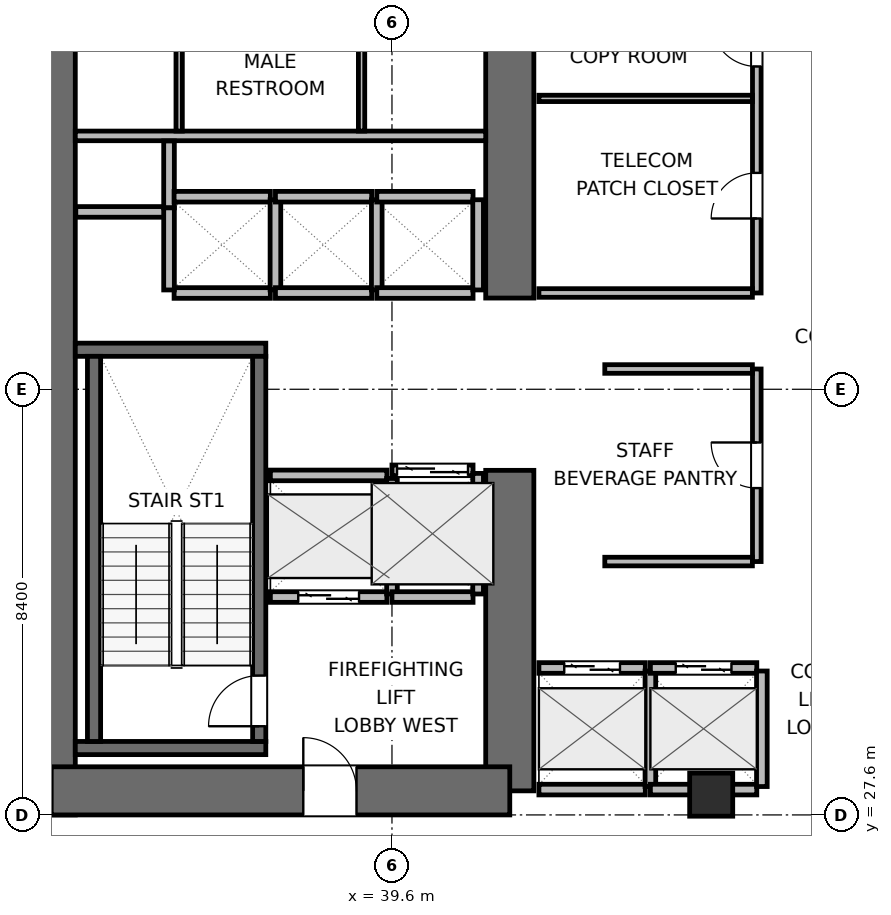
"""IFC4 building model, lengths in metres.
Left out: names, types, materials, properties, quantities, classifications, styles, units other than length and angle.
Written with IfcOpenShell. Run it as: python <this file> out.ifc"""

import sys

from ifc_helpers import new_model, si_unit, direction, frame, frame_2d, origin, origin_2d, place, context, subcontext, project, spatial, rectangle, extrude, element, fill, save


model = new_model("IFC4")
c1 = context("Model", 3, precision=1e-05, world=origin(), true_north=direction((0.0, 1.0)))
c2 = subcontext(c1, "Body", "Model", "MODEL_VIEW")
j1 = project(units=[si_unit("LENGTHUNIT", "METRE"), si_unit("PLANEANGLEUNIT", "RADIAN")], contexts=[c1])
p1 = place(None, origin())
s1 = spatial("IfcSite", under=j1, at=p1, CompositionType="ELEMENT")
p2 = place(p1, origin())
s2 = spatial("IfcBuilding", under=s1, at=p2, CompositionType="ELEMENT")
p3 = place(p2, frame((0.0, 0.0, 29.4)))
s3 = spatial("IfcBuildingStorey", under=s2, at=p3, CompositionType="ELEMENT", Elevation=29.4)
p4 = place(p3, frame((32.875, 27.6, 0.0), z_axis=(0.0, 0.0, 1.0), x_axis=(0.0, 1.0, 0.0)))
e1 = element("IfcWall", 1, at=p4, inside=s3, PredefinedType="SHEAR", context=c2, shape_type="SweptSolid", body=[
    extrude(rectangle(XDim=16.8, YDim=0.95, at=frame_2d((8.4, 0.0))), origin(), (0.0, 0.0, 1.0), 3.9),
])
p5 = place(p3, frame((41.925, 28.075, 0.0), z_axis=(0.0, 0.0, 1.0), x_axis=(0.0, 1.0, 0.0)))
e2 = element("IfcWall", 2, at=p5, inside=s3, PredefinedType="SHEAR", context=c2, shape_type="SweptSolid", body=[
    extrude(rectangle(XDim=6.325, YDim=0.95, at=frame_2d((3.163, 0.0))), origin(), (0.0, 0.0, 1.0), 3.9),
])
p6 = place(p3, frame((41.925, 37.8, 0.0), z_axis=(0.0, 0.0, 1.0), x_axis=(0.0, 1.0, 0.0)))
e3 = element("IfcWall", 3, at=p6, inside=s3, PredefinedType="SHEAR", context=c2, shape_type="SweptSolid", body=[
    extrude(rectangle(XDim=6.125, YDim=0.95, at=frame_2d((3.062, 0.0))), origin(), (0.0, 0.0, 1.0), 3.9),
])
p7 = place(p3, frame((32.875, 28.075, 0.0), z_axis=(0.0, 0.0, 1.0), x_axis=(1.0, 0.0, 0.0)))
e4 = element("IfcWall", 4, at=p7, inside=s3, PredefinedType="SHEAR", context=c2, shape_type="SweptSolid", body=[
    extrude(rectangle(XDim=9.05, YDim=0.95, at=frame_2d((4.525, 0.0))), origin(), (0.0, 0.0, 1.0), 3.9),
])
p8 = place(p7, frame((4.975, 0.0, 0.0)))
e5 = element("IfcOpeningElement", 5, at=p8, cuts=e4, PredefinedType="OPENING", context=c2, shape_type="SweptSolid", body=[
    extrude(rectangle(XDim=1.05, YDim=2.04, at=frame_2d((0.525, 1.02))), frame((0.0, 0.485, 0.0), z_axis=(0.0, -1.0, 0.0), x_axis=(1.0, 0.0, 0.0)), (0.0, 0.0, 1.0), 0.97),
])
for number, where, z_axis, x_axis in (
    (6, (33.35, 28.92, 0.0), (0.0, 0.0, 1.0), (1.0, 0.0, 0.0)),
    (7, (33.35, 36.78, 0.0), (0.0, 0.0, 1.0), (1.0, 0.0, 0.0)),
):
    element("IfcWall", number, at=place(p3, frame(where, z_axis=z_axis, x_axis=x_axis)), inside=s3, PredefinedType="SHEAR", context=c2, shape_type="SweptSolid", body=[
        extrude(rectangle(XDim=3.76, YDim=0.26, at=frame_2d((1.88, 0.0))), origin(), (0.0, 0.0, 1.0), 3.9),
    ])
p9 = place(p3, frame((33.72, 29.05, 0.0), z_axis=(0.0, 0.0, 1.0), x_axis=(0.0, 1.0, 0.0)))
e8 = element("IfcWall", 8, at=p9, inside=s3, PredefinedType="SHEAR", context=c2, shape_type="SweptSolid", body=[
    extrude(rectangle(XDim=7.6, YDim=0.26, at=frame_2d((3.8, 0.0))), origin(), (0.0, 0.0, 1.0), 3.9),
])
p10 = place(p3, frame((36.98, 29.05, 0.0), z_axis=(0.0, 0.0, 1.0), x_axis=(0.0, 1.0, 0.0)))
e9 = element("IfcWall", 9, at=p10, inside=s3, PredefinedType="SHEAR", context=c2, shape_type="SweptSolid", body=[
    extrude(rectangle(XDim=7.6, YDim=0.26, at=frame_2d((3.8, 0.0))), origin(), (0.0, 0.0, 1.0), 3.9),
])
p11 = place(p10, frame((0.3, 0.0, 0.0)))
e10 = element("IfcOpeningElement", 10, at=p11, cuts=e9, PredefinedType="OPENING", context=c2, shape_type="SweptSolid", body=[
    extrude(rectangle(XDim=1.0, YDim=2.04, at=frame_2d((0.5, 1.02))), frame((0.0, 0.14, 0.0), z_axis=(0.0, -1.0, 0.0), x_axis=(1.0, 0.0, 0.0)), (0.0, 0.0, 1.0), 0.28),
])
p12 = place(p3, frame((45.9, 28.0, 0.0), z_axis=(0.0, 0.0, 1.0), x_axis=(1.0, 0.0, 0.0)))
e11 = element("IfcColumn", 11, at=p12, inside=s3, PredefinedType="COLUMN", context=c2, shape_type="SweptSolid", body=[
    extrude(rectangle(XDim=0.85, YDim=0.85, at=origin_2d()), origin(), (0.0, 0.0, 1.0), 3.9),
])
p13 = place(p3, frame((33.35, 41.0, 0.0), z_axis=(0.0, 0.0, 1.0), x_axis=(1.0, 0.0, 0.0)))
e12 = element("IfcWall", 12, at=p13, inside=s3, PredefinedType="PLUMBINGWALL", context=c2, shape_type="SweptSolid", body=[
    extrude(rectangle(XDim=8.1, YDim=0.19, at=frame_2d((4.05, 0.0))), origin(), (0.0, 0.0, 1.0), 3.64),
])
for number, where, z_axis, x_axis in (
    (13, (35.4, 41.095, 0.0), (0.0, 0.0, 1.0), (0.0, 1.0, 0.0)),
    (14, (39.0, 41.095, 0.0), (0.0, 0.0, 1.0), (0.0, 1.0, 0.0)),
):
    element("IfcWall", number, at=place(p3, frame(where, z_axis=z_axis, x_axis=x_axis)), inside=s3, PredefinedType="PARTITIONING", context=c2, shape_type="SweptSolid", body=[
        extrude(rectangle(XDim=2.355, YDim=0.125, at=frame_2d((1.177, 0.0))), origin(), (0.0, 0.0, 1.0), 3.64),
    ])
p14 = place(p3, frame((33.36, 39.5, 0.0), z_axis=(0.0, 0.0, 1.0), x_axis=(1.0, 0.0, 0.0)))
e15 = element("IfcWall", 15, at=p14, inside=s3, PredefinedType="PARTITIONING", context=c2, shape_type="SweptSolid", body=[
    extrude(rectangle(XDim=1.86, YDim=0.21, at=frame_2d((0.93, 0.0))), origin(), (0.0, 0.0, 1.0), 3.64),
])
p15 = place(p3, frame((35.2, 39.58, 0.0), z_axis=(0.0, 0.0, 1.0), x_axis=(0.0, 1.0, 0.0)))
e16 = element("IfcWall", 16, at=p15, inside=s3, PredefinedType="PARTITIONING", context=c2, shape_type="SweptSolid", body=[
    extrude(rectangle(XDim=1.32, YDim=0.21, at=frame_2d((0.66, 0.0))), origin(), (0.0, 0.0, 1.0), 3.64),
])
p16 = place(p3, frame((37.2, 31.9, 0.0), z_axis=(0.0, 0.0, 1.0), x_axis=(1.0, 0.0, 0.0)))
e17 = element("IfcWall", 17, at=p16, inside=s3, PredefinedType="PARTITIONING", context=c2, shape_type="SweptSolid", body=[
    extrude(rectangle(XDim=2.3, YDim=0.21, at=frame_2d((1.15, 0.0))), origin(), (0.0, 0.0, 1.0), 3.64),
])
p17 = place(p16, frame((0.55, 0.0, 0.0)))
e18 = element("IfcOpeningElement", 18, at=p17, cuts=e17, PredefinedType="OPENING", context=c2, shape_type="SweptSolid", body=[
    extrude(rectangle(XDim=1.2, YDim=2.04, at=frame_2d((0.6, 1.02))), frame((0.0, 0.115, 0.0), z_axis=(0.0, -1.0, 0.0), x_axis=(1.0, 0.0, 0.0)), (0.0, 0.0, 1.0), 0.23),
])
p18 = place(p3, frame((37.2, 34.3, 0.0), z_axis=(0.0, 0.0, 1.0), x_axis=(1.0, 0.0, 0.0)))
e19 = element("IfcWall", 19, at=p18, inside=s3, PredefinedType="PARTITIONING", context=c2, shape_type="SweptSolid", body=[
    extrude(rectangle(XDim=2.3, YDim=0.21, at=frame_2d((1.15, 0.0))), origin(), (0.0, 0.0, 1.0), 3.64),
])
p19 = place(p3, frame((39.6, 31.96, 0.0), z_axis=(0.0, 0.0, 1.0), x_axis=(0.0, 1.0, 0.0)))
e20 = element("IfcWall", 20, at=p19, inside=s3, PredefinedType="PARTITIONING", context=c2, shape_type="SweptSolid", body=[
    extrude(rectangle(XDim=2.28, YDim=0.21, at=frame_2d((1.14, 0.0))), origin(), (0.0, 0.0, 1.0), 3.64),
])
p20 = place(p3, frame((39.6, 34.4, 0.0), z_axis=(0.0, 0.0, 1.0), x_axis=(1.0, 0.0, 0.0)))
e21 = element("IfcWall", 21, at=p20, inside=s3, PredefinedType="PARTITIONING", context=c2, shape_type="SweptSolid", body=[
    extrude(rectangle(XDim=1.6, YDim=0.21, at=frame_2d((0.8, 0.0))), origin(), (0.0, 0.0, 1.0), 3.64),
])
p21 = place(p20, frame((0.1, 0.0, 0.0)))
e22 = element("IfcOpeningElement", 22, at=p21, cuts=e21, PredefinedType="OPENING", context=c2, shape_type="SweptSolid", body=[
    extrude(rectangle(XDim=1.4, YDim=2.06, at=frame_2d((0.7, 1.03))), frame((0.0, 0.115, 0.0), z_axis=(0.0, -1.0, 0.0), x_axis=(1.0, 0.0, 0.0)), (0.0, 0.0, 1.0), 0.23),
])
p22 = place(p3, frame((39.6, 31.9, 0.0), z_axis=(0.0, 0.0, 1.0), x_axis=(1.0, 0.0, 0.0)))
e23 = element("IfcWall", 23, at=p22, inside=s3, PredefinedType="PARTITIONING", context=c2, shape_type="SweptSolid", body=[
    extrude(rectangle(XDim=1.6, YDim=0.21, at=frame_2d((0.8, 0.0))), origin(), (0.0, 0.0, 1.0), 3.64),
])
p23 = place(p3, frame((41.3, 31.96, 0.0), z_axis=(0.0, 0.0, 1.0), x_axis=(0.0, 1.0, 0.0)))
e24 = element("IfcWall", 24, at=p23, inside=s3, PredefinedType="PARTITIONING", context=c2, shape_type="SweptSolid", body=[
    extrude(rectangle(XDim=2.38, YDim=0.21, at=frame_2d((1.19, 0.0))), origin(), (0.0, 0.0, 1.0), 3.64),
])
p24 = place(p3, frame((42.5, 30.5, 0.0), z_axis=(0.0, 0.0, 1.0), x_axis=(1.0, 0.0, 0.0)))
e25 = element("IfcWall", 25, at=p24, inside=s3, PredefinedType="PARTITIONING", context=c2, shape_type="SweptSolid", body=[
    extrude(rectangle(XDim=2.1, YDim=0.21, at=frame_2d((1.05, 0.0))), origin(), (0.0, 0.0, 1.0), 3.64),
])
p25 = place(p24, frame((0.5, 0.0, 0.0)))
e26 = element("IfcOpeningElement", 26, at=p25, cuts=e25, PredefinedType="OPENING", context=c2, shape_type="SweptSolid", body=[
    extrude(rectangle(XDim=1.1, YDim=2.04, at=frame_2d((0.55, 1.02))), frame((0.0, 0.115, 0.0), z_axis=(0.0, -1.0, 0.0), x_axis=(1.0, 0.0, 0.0)), (0.0, 0.0, 1.0), 0.23),
])
p26 = place(p3, frame((42.5, 28.1, 0.0), z_axis=(0.0, 0.0, 1.0), x_axis=(1.0, 0.0, 0.0)))
e27 = element("IfcWall", 27, at=p26, inside=s3, PredefinedType="PARTITIONING", context=c2, shape_type="SweptSolid", body=[
    extrude(rectangle(XDim=2.1, YDim=0.21, at=frame_2d((1.05, 0.0))), origin(), (0.0, 0.0, 1.0), 2.525),
])
p27 = place(p3, frame((44.7, 28.16, 0.0), z_axis=(0.0, 0.0, 1.0), x_axis=(0.0, 1.0, 0.0)))
e28 = element("IfcWall", 28, at=p27, inside=s3, PredefinedType="PARTITIONING", context=c2, shape_type="SweptSolid", body=[
    extrude(rectangle(XDim=2.28, YDim=0.21, at=frame_2d((1.14, 0.0))), origin(), (0.0, 0.0, 1.0), 3.64),
])
p28 = place(p3, frame((44.7, 30.5, 0.0), z_axis=(0.0, 0.0, 1.0), x_axis=(1.0, 0.0, 0.0)))
e29 = element("IfcWall", 29, at=p28, inside=s3, PredefinedType="PARTITIONING", context=c2, shape_type="SweptSolid", body=[
    extrude(rectangle(XDim=2.1, YDim=0.21, at=frame_2d((1.05, 0.0))), origin(), (0.0, 0.0, 1.0), 3.64),
])
p29 = place(p28, frame((0.5, 0.0, 0.0)))
e30 = element("IfcOpeningElement", 30, at=p29, cuts=e29, PredefinedType="OPENING", context=c2, shape_type="SweptSolid", body=[
    extrude(rectangle(XDim=1.1, YDim=2.04, at=frame_2d((0.55, 1.02))), frame((0.0, 0.115, 0.0), z_axis=(0.0, -1.0, 0.0), x_axis=(1.0, 0.0, 0.0)), (0.0, 0.0, 1.0), 0.23),
])
p30 = place(p3, frame((44.7, 28.1, 0.0), z_axis=(0.0, 0.0, 1.0), x_axis=(1.0, 0.0, 0.0)))
e31 = element("IfcWall", 31, at=p30, inside=s3, PredefinedType="PARTITIONING", context=c2, shape_type="SweptSolid", body=[
    extrude(rectangle(XDim=2.1, YDim=0.21, at=frame_2d((1.05, 0.0))), origin(), (0.0, 0.0, 1.0), 2.525),
])
p31 = place(p3, frame((46.9, 28.16, 0.0), z_axis=(0.0, 0.0, 1.0), x_axis=(0.0, 1.0, 0.0)))
e32 = element("IfcWall", 32, at=p31, inside=s3, PredefinedType="PARTITIONING", context=c2, shape_type="SweptSolid", body=[
    extrude(rectangle(XDim=2.28, YDim=0.21, at=frame_2d((1.14, 0.0))), origin(), (0.0, 0.0, 1.0), 3.64),
])
for number, where, z_axis, x_axis in (
    (33, (35.3, 37.9, 0.0), (0.0, 0.0, 1.0), (1.0, 0.0, 0.0)),
    (34, (35.3, 39.8, 0.0), (0.0, 0.0, 1.0), (1.0, 0.0, 0.0)),
):
    element("IfcWall", number, at=place(p3, frame(where, z_axis=z_axis, x_axis=x_axis)), inside=s3, PredefinedType="PARTITIONING", context=c2, shape_type="SweptSolid", body=[
        extrude(rectangle(XDim=1.9, YDim=0.21, at=frame_2d((0.95, 0.0))), origin(), (0.0, 0.0, 1.0), 3.64),
    ])
p32 = place(p3, frame((35.2, 37.96, 0.0), z_axis=(0.0, 0.0, 1.0), x_axis=(0.0, 1.0, 0.0)))
e35 = element("IfcWall", 35, at=p32, inside=s3, PredefinedType="PARTITIONING", context=c2, shape_type="SweptSolid", body=[
    extrude(rectangle(XDim=1.62, YDim=0.21, at=frame_2d((0.81, 0.0))), origin(), (0.0, 0.0, 1.0), 3.64),
])
p33 = place(p3, frame((37.3, 37.96, 0.0), z_axis=(0.0, 0.0, 1.0), x_axis=(0.0, 1.0, 0.0)))
e36 = element("IfcWall", 36, at=p33, inside=s3, PredefinedType="PARTITIONING", context=c2, shape_type="SweptSolid", body=[
    extrude(rectangle(XDim=1.78, YDim=0.21, at=frame_2d((0.89, 0.0))), origin(), (0.0, 0.0, 1.0), 3.64),
])
for number, where, z_axis, x_axis in (
    (37, (37.3, 37.9, 0.0), (0.0, 0.0, 1.0), (1.0, 0.0, 0.0)),
    (38, (37.3, 39.8, 0.0), (0.0, 0.0, 1.0), (1.0, 0.0, 0.0)),
):
    element("IfcWall", number, at=place(p3, frame(where, z_axis=z_axis, x_axis=x_axis)), inside=s3, PredefinedType="PARTITIONING", context=c2, shape_type="SweptSolid", body=[
        extrude(rectangle(XDim=1.9, YDim=0.21, at=frame_2d((0.95, 0.0))), origin(), (0.0, 0.0, 1.0), 3.64),
    ])
p34 = place(p3, frame((39.3, 37.96, 0.0), z_axis=(0.0, 0.0, 1.0), x_axis=(0.0, 1.0, 0.0)))
e39 = element("IfcWall", 39, at=p34, inside=s3, PredefinedType="PARTITIONING", context=c2, shape_type="SweptSolid", body=[
    extrude(rectangle(XDim=1.78, YDim=0.21, at=frame_2d((0.89, 0.0))), origin(), (0.0, 0.0, 1.0), 3.64),
])
for number, where, z_axis, x_axis in (
    (40, (39.3, 37.9, 0.0), (0.0, 0.0, 1.0), (1.0, 0.0, 0.0)),
    (41, (39.3, 39.8, 0.0), (0.0, 0.0, 1.0), (1.0, 0.0, 0.0)),
):
    element("IfcWall", number, at=place(p3, frame(where, z_axis=z_axis, x_axis=x_axis)), inside=s3, PredefinedType="PARTITIONING", context=c2, shape_type="SweptSolid", body=[
        extrude(rectangle(XDim=1.9, YDim=0.21, at=frame_2d((0.95, 0.0))), origin(), (0.0, 0.0, 1.0), 3.64),
    ])
p35 = place(p3, frame((41.3, 37.96, 0.0), z_axis=(0.0, 0.0, 1.0), x_axis=(0.0, 1.0, 0.0)))
e42 = element("IfcWall", 42, at=p35, inside=s3, PredefinedType="PARTITIONING", context=c2, shape_type="SweptSolid", body=[
    extrude(rectangle(XDim=1.78, YDim=0.21, at=frame_2d((0.89, 0.0))), origin(), (0.0, 0.0, 1.0), 3.64),
])
p36 = place(p3, frame((46.8, 32.6, 0.0), z_axis=(0.0, 0.0, 1.0), x_axis=(0.0, 1.0, 0.0)))
e43 = element("IfcWall", 43, at=p36, inside=s3, PredefinedType="PARTITIONING", context=c2, shape_type="SweptSolid", body=[
    extrude(rectangle(XDim=3.8, YDim=0.17, at=frame_2d((1.9, 0.0))), origin(), (0.0, 0.0, 1.0), 3.64),
])
p37 = place(p36, frame((1.45, 0.0, 0.0)))
e44 = element("IfcOpeningElement", 44, at=p37, cuts=e43, PredefinedType="OPENING", context=c2, shape_type="SweptSolid", body=[
    extrude(rectangle(XDim=0.9, YDim=2.02, at=frame_2d((0.45, 1.01))), frame((0.0, 0.095, 0.0), z_axis=(0.0, -1.0, 0.0), x_axis=(1.0, 0.0, 0.0)), (0.0, 0.0, 1.0), 0.19),
])
for number, where, z_axis, x_axis in (
    (45, (43.8, 32.6, 0.0), (0.0, 0.0, 1.0), (1.0, 0.0, 0.0)),
    (46, (43.8, 36.4, 0.0), (0.0, 0.0, 1.0), (1.0, 0.0, 0.0)),
):
    element("IfcWall", number, at=place(p3, frame(where, z_axis=z_axis, x_axis=x_axis)), inside=s3, PredefinedType="PARTITIONING", context=c2, shape_type="SweptSolid", body=[
        extrude(rectangle(XDim=2.913, YDim=0.17, at=frame_2d((1.457, 0.0))), origin(), (0.0, 0.0, 1.0), 3.64),
    ])
p38 = place(p3, frame((46.8, 37.9, 0.0), z_axis=(0.0, 0.0, 1.0), x_axis=(0.0, 1.0, 0.0)))
e47 = element("IfcWall", 47, at=p38, inside=s3, PredefinedType="PARTITIONING", context=c2, shape_type="SweptSolid", body=[
    extrude(rectangle(XDim=6.0, YDim=0.17, at=frame_2d((3.0, 0.0))), origin(), (0.0, 0.0, 1.0), 3.64),
])
p39 = place(p38, frame((1.47, 0.0, 0.0)))
e48 = element("IfcOpeningElement", 48, at=p39, cuts=e47, PredefinedType="OPENING", context=c2, shape_type="SweptSolid", body=[
    extrude(rectangle(XDim=0.9, YDim=2.02, at=frame_2d((0.45, 1.01))), frame((0.0, 0.095, 0.0), z_axis=(0.0, -1.0, 0.0), x_axis=(1.0, 0.0, 0.0)), (0.0, 0.0, 1.0), 0.19),
])
p40 = place(p38, frame((4.47, 0.0, 0.0)))
e49 = element("IfcOpeningElement", 49, at=p40, cuts=e47, PredefinedType="OPENING", context=c2, shape_type="SweptSolid", body=[
    extrude(rectangle(XDim=0.9, YDim=2.02, at=frame_2d((0.45, 1.01))), frame((0.0, 0.095, 0.0), z_axis=(0.0, -1.0, 0.0), x_axis=(1.0, 0.0, 0.0)), (0.0, 0.0, 1.0), 0.19),
])
p41 = place(p3, frame((42.5, 37.9, 0.0), z_axis=(0.0, 0.0, 1.0), x_axis=(1.0, 0.0, 0.0)))
e50 = element("IfcWall", 50, at=p41, inside=s3, PredefinedType="PARTITIONING", context=c2, shape_type="SweptSolid", body=[
    extrude(rectangle(XDim=4.213, YDim=0.17, at=frame_2d((2.106, 0.0))), origin(), (0.0, 0.0, 1.0), 3.64),
])
p42 = place(p3, frame((42.5, 41.74, 0.0), z_axis=(0.0, 0.0, 1.0), x_axis=(1.0, 0.0, 0.0)))
e51 = element("IfcWall", 51, at=p42, inside=s3, PredefinedType="PARTITIONING", context=c2, shape_type="SweptSolid", body=[
    extrude(rectangle(XDim=4.213, YDim=0.125, at=frame_2d((2.106, 0.0))), origin(), (0.0, 0.0, 1.0), 3.64),
])
p43 = place(p11, origin())
e52 = element("IfcDoor", 52, at=p43, inside=s3, OperationType="SINGLE_SWING_LEFT", PredefinedType="DOOR", context=c2, shape_type="SweptSolid", body=[
    extrude(rectangle(XDim=1.0, YDim=2.04, at=frame_2d((0.5, 1.02))), frame((0.0, 0.025, 0.0), z_axis=(0.0, -1.0, 0.0), x_axis=(1.0, 0.0, 0.0)), (0.0, 0.0, 1.0), 0.05),
])
fill(e10, e52)
p44 = place(p17, origin())
e53 = element("IfcDoor", 53, at=p44, inside=s3, OperationType="DOUBLE_DOOR_SLIDING", PredefinedType="DOOR", context=c2, shape_type="SweptSolid", body=[
    extrude(rectangle(XDim=1.2, YDim=2.04, at=frame_2d((0.6, 1.02))), frame((0.0, 0.025, 0.0), z_axis=(0.0, -1.0, 0.0), x_axis=(1.0, 0.0, 0.0)), (0.0, 0.0, 1.0), 0.05),
])
fill(e18, e53)
p45 = place(p21, origin())
e54 = element("IfcDoor", 54, at=p45, inside=s3, OperationType="DOUBLE_DOOR_SLIDING", PredefinedType="DOOR", context=c2, shape_type="SweptSolid", body=[
    extrude(rectangle(XDim=1.4, YDim=2.06, at=frame_2d((0.7, 1.03))), frame((0.0, 0.025, 0.0), z_axis=(0.0, -1.0, 0.0), x_axis=(1.0, 0.0, 0.0)), (0.0, 0.0, 1.0), 0.05),
])
fill(e22, e54)
p46 = place(p25, origin())
e55 = element("IfcDoor", 55, at=p46, inside=s3, OperationType="DOUBLE_DOOR_SLIDING", PredefinedType="DOOR", context=c2, shape_type="SweptSolid", body=[
    extrude(rectangle(XDim=1.1, YDim=2.04, at=frame_2d((0.55, 1.02))), frame((0.0, 0.025, 0.0), z_axis=(0.0, -1.0, 0.0), x_axis=(1.0, 0.0, 0.0)), (0.0, 0.0, 1.0), 0.05),
])
fill(e26, e55)
p47 = place(p29, origin())
e56 = element("IfcDoor", 56, at=p47, inside=s3, OperationType="DOUBLE_DOOR_SLIDING", PredefinedType="DOOR", context=c2, shape_type="SweptSolid", body=[
    extrude(rectangle(XDim=1.1, YDim=2.04, at=frame_2d((0.55, 1.02))), frame((0.0, 0.025, 0.0), z_axis=(0.0, -1.0, 0.0), x_axis=(1.0, 0.0, 0.0)), (0.0, 0.0, 1.0), 0.05),
])
fill(e30, e56)
p48 = place(p8, origin())
e57 = element("IfcDoor", 57, at=p48, inside=s3, OperationType="SINGLE_SWING_LEFT", PredefinedType="DOOR", context=c2, shape_type="SweptSolid", body=[
    extrude(rectangle(XDim=1.05, YDim=2.04, at=frame_2d((0.525, 1.02))), frame((0.0, 0.025, 0.0), z_axis=(0.0, -1.0, 0.0), x_axis=(1.0, 0.0, 0.0)), (0.0, 0.0, 1.0), 0.05),
])
fill(e5, e57)
p49 = place(p37, origin())
e58 = element("IfcDoor", 58, at=p49, inside=s3, OperationType="SINGLE_SWING_RIGHT", PredefinedType="DOOR", context=c2, shape_type="SweptSolid", body=[
    extrude(rectangle(XDim=0.9, YDim=2.02, at=frame_2d((0.45, 1.01))), frame((0.0, 0.025, 0.0), z_axis=(0.0, -1.0, 0.0), x_axis=(1.0, 0.0, 0.0)), (0.0, 0.0, 1.0), 0.05),
])
fill(e44, e58)
p50 = place(p39, origin())
e59 = element("IfcDoor", 59, at=p50, inside=s3, OperationType="SINGLE_SWING_LEFT", PredefinedType="DOOR", context=c2, shape_type="SweptSolid", body=[
    extrude(rectangle(XDim=0.9, YDim=2.02, at=frame_2d((0.45, 1.01))), frame((0.0, 0.025, 0.0), z_axis=(0.0, -1.0, 0.0), x_axis=(1.0, 0.0, 0.0)), (0.0, 0.0, 1.0), 0.05),
])
fill(e48, e59)
p51 = place(p40, origin())
e60 = element("IfcDoor", 60, at=p51, inside=s3, OperationType="SINGLE_SWING_RIGHT", PredefinedType="DOOR", context=c2, shape_type="SweptSolid", body=[
    extrude(rectangle(XDim=0.9, YDim=2.02, at=frame_2d((0.45, 1.01))), frame((0.0, 0.025, 0.0), z_axis=(0.0, -1.0, 0.0), x_axis=(1.0, 0.0, 0.0)), (0.0, 0.0, 1.0), 0.05),
])
fill(e49, e60)
save(model, sys.argv[1])
